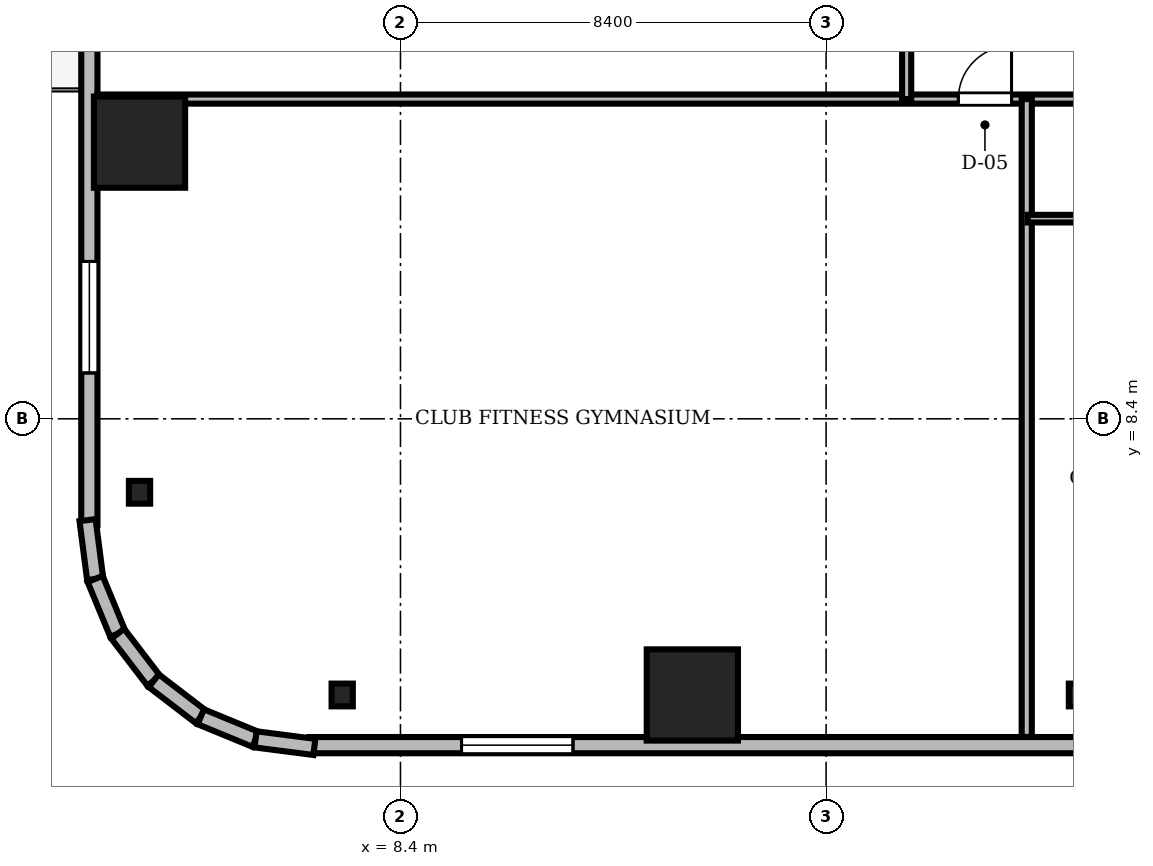
"""IFC4 building model, lengths in metres.
Left out: names, types, materials, properties, quantities, classifications, styles, units other than length and angle.
Written with IfcOpenShell. Run it as: python <this file> out.ifc"""

import sys

from ifc_helpers import new_model, si_unit, direction, frame, frame_2d, origin, origin_2d, place, context, subcontext, project, spatial, rectangle, i_section, extrude, source, transform, mapped, element, fill, save


model = new_model("IFC4")
c1 = context("Model", 3, precision=1e-05, world=origin(), true_north=direction((0.0, 1.0)))
c2 = subcontext(c1, "Body", "Model", "MODEL_VIEW")
j1 = project(units=[si_unit("LENGTHUNIT", "METRE"), si_unit("PLANEANGLEUNIT", "RADIAN")], contexts=[c1])
p1 = place(None, origin())
s1 = spatial("IfcSite", under=j1, at=p1, CompositionType="ELEMENT")
p2 = place(p1, origin())
s2 = spatial("IfcBuilding", under=s1, at=p2, CompositionType="ELEMENT")
p3 = place(p2, frame((0.0, 0.0, 38.55)))
s3 = spatial("IfcBuildingStorey", under=s2, at=p3, CompositionType="ELEMENT", Elevation=38.55)
m1 = source(origin(), c2, "Body", "SweptSolid", [
    extrude(rectangle(XDim=1.8, YDim=1.8, at=origin_2d()), origin(), (0.0, 0.0, 1.0), 3.41),
])
for number, where, z_axis, x_axis in (
    (1, (14.16, 2.95, 0.0), (0.0, 0.0, 1.0), (1.0, 0.0, 0.0)),
    (2, (3.25, 13.86, 0.0), (0.0, 0.0, 1.0), (1.0, 0.0, 0.0)),
):
    element("IfcColumn", number, at=place(p3, frame(where, z_axis=z_axis, x_axis=x_axis)), inside=s3, PredefinedType="COLUMN", context=c2, shape_type="MappedRepresentation", body=[
        mapped(m1, transform((0.0, 0.0, 0.0), scale=1.0)),
    ])
m2 = source(origin(), c2, "Body", "SweptSolid", [
    extrude(i_section(OverallWidth=0.419, OverallDepth=0.449, WebThickness=0.031, FlangeThickness=0.048, FilletRadius=0.015, at=origin_2d()), origin(), (0.0, 0.0, 1.0), 3.41),
])
for number, where, z_axis, x_axis in (
    (3, (7.25, 2.95, 0.0), (0.0, 0.0, 1.0), (1.0, 0.0, 0.0)),
    (4, (21.8, 2.95, 0.0), (0.0, 0.0, 1.0), (1.0, 0.0, 0.0)),
    (5, (3.25, 6.95, 0.0), (0.0, 0.0, 1.0), (1.0, 0.0, 0.0)),
):
    element("IfcColumn", number, at=place(p3, frame(where, z_axis=z_axis, x_axis=x_axis)), inside=s3, PredefinedType="COLUMN", context=c2, shape_type="MappedRepresentation", body=[
        mapped(m2, transform((0.0, 0.0, 0.0), scale=1.0)),
    ])
m3 = source(origin(), c2, "Body", "SweptSolid", [
    extrude(rectangle(XDim=15.6, YDim=0.32, at=frame_2d((7.8, 0.0))), origin(), (0.0, 0.0, 1.0), 3.41),
])
p4 = place(p3, frame((6.6, 1.96, 0.0), z_axis=(0.0, 0.0, 1.0), x_axis=(1.0, 0.0, 0.0)))
e6 = element("IfcWall", 6, at=p4, inside=s3, PredefinedType="SOLIDWALL", context=c2, shape_type="MappedRepresentation", body=[
    mapped(m3, transform((0.0, 0.0, 0.0), scale=1.0)),
])
m4 = source(origin(), c2, "Body", "SweptSolid", [
    extrude(rectangle(XDim=2.2, YDim=2.4, at=frame_2d((1.1, 1.2))), frame((0.0, 0.17, 0.0), z_axis=(0.0, -1.0, 0.0), x_axis=(1.0, 0.0, 0.0)), (0.0, 0.0, 1.0), 0.34),
])
p5 = place(p4, frame((3.005, 0.0, 0.72)))
e7 = element("IfcOpeningElement", 7, at=p5, cuts=e6, PredefinedType="OPENING", context=c2, shape_type="MappedRepresentation", body=[
    mapped(m4, transform((0.0, 0.0, 0.0), scale=1.0)),
])
p6 = place(p3, frame((2.26, 21.9, 0.0), z_axis=(0.0, 0.0, 1.0), x_axis=(0.0, -1.0, 0.0)))
e8 = element("IfcWall", 8, at=p6, inside=s3, PredefinedType="SOLIDWALL", context=c2, shape_type="MappedRepresentation", body=[
    mapped(m3, transform((0.0, 0.0, 0.0), scale=1.0)),
])
m5 = source(origin(), c2, "Body", "SweptSolid", [
    extrude(rectangle(XDim=1.4, YDim=2.3, at=frame_2d((0.7, 1.15))), frame((0.0, 0.17, 0.0), z_axis=(0.0, -1.0, 0.0), x_axis=(1.0, 0.0, 0.0)), (0.0, 0.0, 1.0), 0.34),
])
p7 = place(p6, frame((4.59, 0.0, 0.0)))
e9 = element("IfcOpeningElement", 9, at=p7, cuts=e8, PredefinedType="OPENING", context=c2, shape_type="MappedRepresentation", body=[
    mapped(m5, transform((0.0, 0.0, 0.0), scale=1.0)),
])
p8 = place(p6, frame((10.395, 0.0, 0.72)))
e10 = element("IfcOpeningElement", 10, at=p8, cuts=e8, PredefinedType="OPENING", context=c2, shape_type="MappedRepresentation", body=[
    mapped(m4, transform((0.0, 0.0, 0.0), scale=1.0)),
])
m6 = source(origin(), c2, "Body", "SweptSolid", [
    extrude(rectangle(XDim=1.171, YDim=0.32, at=frame_2d((0.585, 0.0))), origin(), (0.0, 0.0, 1.0), 3.41),
])
p9 = place(p3, frame((2.224, 6.401, 0.0), z_axis=(0.0, 0.0, 1.0), x_axis=(0.128269133229, -0.991739395941, 0.0)))
e11 = element("IfcWall", 11, at=p9, inside=s3, PredefinedType="SOLIDWALL", context=c2, shape_type="MappedRepresentation", body=[
    mapped(m6, transform((0.0, 0.0, 0.0), scale=1.0)),
])
m7 = source(origin(), c2, "Body", "SweptSolid", [
    extrude(rectangle(XDim=1.169, YDim=0.32, at=frame_2d((0.584, 0.0))), origin(), (0.0, 0.0, 1.0), 3.41),
])
for number, where, z_axis, x_axis in (
    (12, (2.375, 5.24, 0.0), (0.0, 0.0, 1.0), (0.381, -0.925, 0.0)),
    (13, (2.82, 4.159, 0.0), (0.0, 0.0, 1.0), (0.608, -0.794, 0.0)),
):
    element("IfcWall", number, at=place(p3, frame(where, z_axis=z_axis, x_axis=x_axis)), inside=s3, PredefinedType="SOLIDWALL", context=c2, shape_type="MappedRepresentation", body=[
        mapped(m7, transform((0.0, 0.0, 0.0), scale=1.0)),
    ])
m8 = source(origin(), c2, "Body", "SweptSolid", [
    extrude(rectangle(XDim=1.169, YDim=0.32, at=frame_2d((0.584, 0.0))), origin(), (0.0, 0.0, 1.0), 3.41),
])
p10 = place(p3, frame((3.531, 3.231, 0.0), z_axis=(0.0, 0.0, 1.0), x_axis=(0.793663520347, -0.608356981114, 0.0)))
e14 = element("IfcWall", 14, at=p10, inside=s3, PredefinedType="SOLIDWALL", context=c2, shape_type="MappedRepresentation", body=[
    mapped(m8, transform((0.0, 0.0, 0.0), scale=1.0)),
])
m9 = source(origin(), c2, "Body", "SweptSolid", [
    extrude(rectangle(XDim=1.169, YDim=0.32, at=frame_2d((0.585, 0.0))), origin(), (0.0, 0.0, 1.0), 3.41),
])
p11 = place(p3, frame((4.459, 2.52, 0.0), z_axis=(0.0, 0.0, 1.0), x_axis=(0.924479075121, -0.381232789334, 0.0)))
e15 = element("IfcWall", 15, at=p11, inside=s3, PredefinedType="SOLIDWALL", context=c2, shape_type="MappedRepresentation", body=[
    mapped(m9, transform((0.0, 0.0, 0.0), scale=1.0)),
])
m10 = source(origin(), c2, "Body", "SweptSolid", [
    extrude(rectangle(XDim=1.17, YDim=0.32, at=frame_2d((0.585, 0.0))), origin(), (0.0, 0.0, 1.0), 3.41),
])
p12 = place(p3, frame((5.54, 2.074, 0.0), z_axis=(0.0, 0.0, 1.0), x_axis=(0.991762485493, -0.128090485085, 0.0)))
e16 = element("IfcWall", 16, at=p12, inside=s3, PredefinedType="SOLIDWALL", context=c2, shape_type="MappedRepresentation", body=[
    mapped(m10, transform((0.0, 0.0, 0.0), scale=1.0)),
])
m11 = source(origin(), c2, "Body", "SweptSolid", [
    extrude(rectangle(XDim=46.156, YDim=0.18, at=frame_2d((23.078, 0.0))), origin(), (0.0, 0.0, 1.0), 2.652),
])
p13 = place(p3, frame((2.422, 14.71, 0.0), z_axis=(0.0, 0.0, 1.0), x_axis=(1.0, 0.0, 0.0)))
e17 = element("IfcWall", 17, at=p13, inside=s3, PredefinedType="PARTITIONING", context=c2, shape_type="MappedRepresentation", body=[
    mapped(m11, transform((0.0, 0.0, 0.0), scale=1.0)),
])
m12 = source(origin(), c2, "Body", "SweptSolid", [
    extrude(rectangle(XDim=1.05, YDim=2.2, at=frame_2d((0.525, 1.1))), frame((0.0, 0.1, 0.0), z_axis=(0.0, -1.0, 0.0), x_axis=(1.0, 0.0, 0.0)), (0.0, 0.0, 1.0), 0.2),
])
p14 = place(p13, frame((16.988, 0.0, 0.0)))
e18 = element("IfcOpeningElement", 18, at=p14, cuts=e17, PredefinedType="OPENING", context=c2, shape_type="MappedRepresentation", body=[
    mapped(m12, transform((0.0, 0.0, 0.0), scale=1.0)),
])
m13 = source(origin(), c2, "Body", "SweptSolid", [
    extrude(rectangle(XDim=0.95, YDim=2.15, at=frame_2d((0.475, 1.075))), frame((0.0, 0.1, 0.0), z_axis=(0.0, -1.0, 0.0), x_axis=(1.0, 0.0, 0.0)), (0.0, 0.0, 1.0), 0.2),
])
p15 = place(p13, frame((21.556, 0.0, 0.0)))
e19 = element("IfcOpeningElement", 19, at=p15, cuts=e17, PredefinedType="OPENING", context=c2, shape_type="MappedRepresentation", body=[
    mapped(m13, transform((0.0, 0.0, 0.0), scale=1.0)),
])
p16 = place(p13, frame((25.358, 0.0, 0.0)))
e20 = element("IfcOpeningElement", 20, at=p16, cuts=e17, PredefinedType="OPENING", context=c2, shape_type="MappedRepresentation", body=[
    mapped(m12, transform((0.0, 0.0, 0.0), scale=1.0)),
])
p17 = place(p13, frame((30.385, 0.0, 0.0)))
e21 = element("IfcOpeningElement", 21, at=p17, cuts=e17, PredefinedType="OPENING", context=c2, shape_type="MappedRepresentation", body=[
    mapped(m12, transform((0.0, 0.0, 0.0), scale=1.0)),
])
p18 = place(p13, frame((35.411, 0.0, 0.0)))
e22 = element("IfcOpeningElement", 22, at=p18, cuts=e17, PredefinedType="OPENING", context=c2, shape_type="MappedRepresentation", body=[
    mapped(m12, transform((0.0, 0.0, 0.0), scale=1.0)),
])
p19 = place(p13, frame((41.766, 0.0, 0.0)))
e23 = element("IfcOpeningElement", 23, at=p19, cuts=e17, PredefinedType="OPENING", context=c2, shape_type="MappedRepresentation", body=[
    mapped(m12, transform((0.0, 0.0, 0.0), scale=1.0)),
])
m14 = source(origin(), c2, "Body", "SweptSolid", [
    extrude(rectangle(XDim=13.84, YDim=0.18, at=frame_2d((6.92, 0.0))), origin(), (0.0, 0.0, 1.0), 2.802),
])
p20 = place(p3, frame((18.39, 14.71, 0.0), z_axis=(0.0, 0.0, 1.0), x_axis=(0.0, 1.0, 0.0)))
e24 = element("IfcWall", 24, at=p20, inside=s3, PredefinedType="PARTITIONING", context=c2, shape_type="MappedRepresentation", body=[
    mapped(m14, transform((0.0, 0.0, 0.0), scale=1.0)),
])
p21 = place(p20, frame((1.762, 0.0, 0.0)))
e25 = element("IfcOpeningElement", 25, at=p21, cuts=e24, PredefinedType="OPENING", context=c2, shape_type="MappedRepresentation", body=[
    mapped(m12, transform((0.0, 0.0, 0.0), scale=1.0)),
])
p22 = place(p20, frame((7.55, 0.0, 0.0)))
e26 = element("IfcOpeningElement", 26, at=p22, cuts=e24, PredefinedType="OPENING", context=c2, shape_type="MappedRepresentation", body=[
    mapped(m13, transform((0.0, 0.0, 0.0), scale=1.0)),
])
p23 = place(p20, frame((12.113, 0.0, 0.0)))
e27 = element("IfcOpeningElement", 27, at=p23, cuts=e24, PredefinedType="OPENING", context=c2, shape_type="MappedRepresentation", body=[
    mapped(m13, transform((0.0, 0.0, 0.0), scale=1.0)),
])
m15 = source(origin(), c2, "Body", "SweptSolid", [
    extrude(rectangle(XDim=12.588, YDim=0.2, at=frame_2d((6.294, 0.0))), origin(), (0.0, 0.0, 1.0), 2.652),
])
p24 = place(p3, frame((20.76, 2.122, 0.0), z_axis=(0.0, 0.0, 1.0), x_axis=(0.0, 1.0, 0.0)))
e28 = element("IfcWall", 28, at=p24, inside=s3, PredefinedType="PARTITIONING", context=c2, shape_type="MappedRepresentation", body=[
    mapped(m15, transform((0.0, 0.0, 0.0), scale=1.0)),
])
m16 = source(origin(), c2, "Body", "SweptSolid", [
    extrude(rectangle(XDim=2.29, YDim=0.15, at=frame_2d((1.145, 0.0))), origin(), (0.0, 0.0, 1.0), 3.41),
])
p25 = place(p3, frame((20.78, 12.35, 0.0), z_axis=(0.0, 0.0, 1.0), x_axis=(1.0, 0.0, 0.0)))
e29 = element("IfcWall", 29, at=p25, inside=s3, PredefinedType="PARTITIONING", context=c2, shape_type="MappedRepresentation", body=[
    mapped(m16, transform((0.0, 0.0, 0.0), scale=1.0)),
])
m17 = source(origin(), c2, "Body", "SweptSolid", [
    extrude(rectangle(XDim=2.2, YDim=2.4, at=frame_2d((1.1, 1.2))), frame((0.0, 0.03, 0.0), z_axis=(0.0, -1.0, 0.0), x_axis=(1.0, 0.0, 0.0)), (0.0, 0.0, 1.0), 0.06),
])
p26 = place(p5, origin())
e30 = element("IfcWindow", 30, at=p26, inside=s3, PartitioningType="SINGLE_PANEL", PredefinedType="WINDOW", context=c2, shape_type="MappedRepresentation", body=[
    mapped(m17, transform((0.0, 0.0, 0.0), scale=1.0)),
])
fill(e7, e30)
p27 = place(p8, origin())
e31 = element("IfcWindow", 31, at=p27, inside=s3, PartitioningType="SINGLE_PANEL", PredefinedType="WINDOW", context=c2, shape_type="MappedRepresentation", body=[
    mapped(m17, transform((0.0, 0.0, 0.0), scale=1.0)),
])
fill(e10, e31)
m18 = source(origin(), c2, "Body", "SweptSolid", [
    extrude(rectangle(XDim=1.05, YDim=2.2, at=frame_2d((0.525, 1.1))), frame((0.0, 0.025, 0.0), z_axis=(0.0, -1.0, 0.0), x_axis=(1.0, 0.0, 0.0)), (0.0, 0.0, 1.0), 0.05),
])
p28 = place(p14, origin())
e32 = element("IfcDoor", 32, at=p28, inside=s3, OperationType="SINGLE_SWING_RIGHT", PredefinedType="DOOR", context=c2, shape_type="MappedRepresentation", body=[
    mapped(m18, transform((0.0, 0.0, 0.0), scale=1.0)),
])
fill(e18, e32)
save(model, sys.argv[1])
